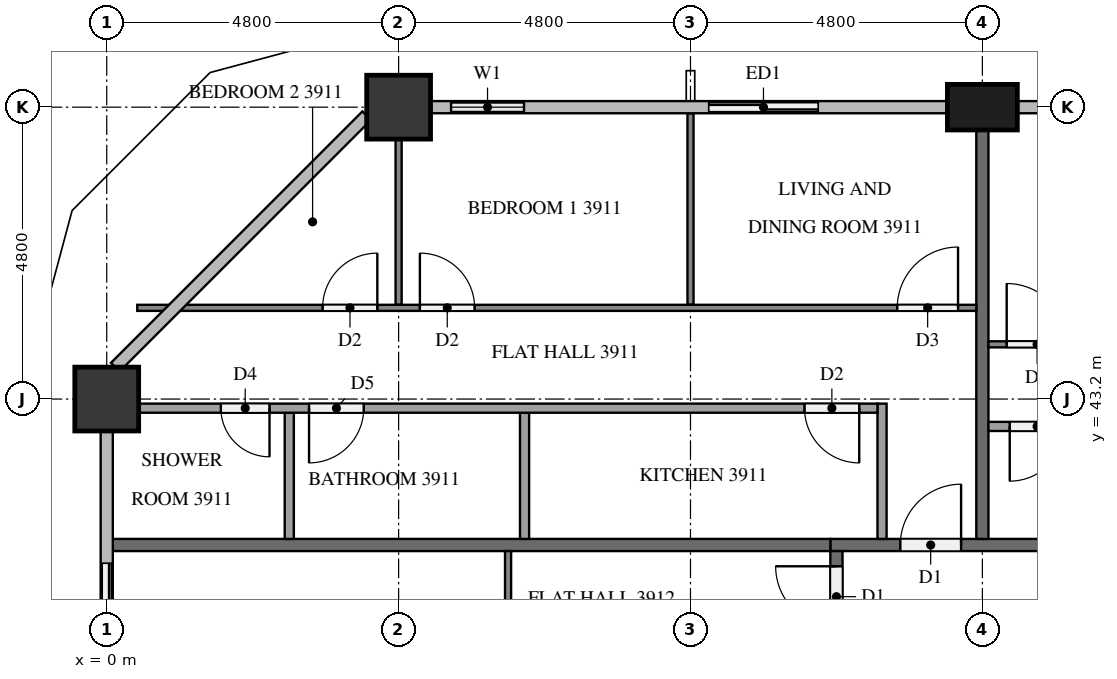
"""IFC4 building model, lengths in metres.
Left out: names, types, materials, properties, quantities, classifications, styles, units other than length and angle.
Written with IfcOpenShell. Run it as: python <this file> out.ifc"""

import sys

from ifc_helpers import new_model, si_unit, direction, frame, frame_2d, origin, origin_2d, place, context, subcontext, project, spatial, rectangle, extrude, element, fill, save


model = new_model("IFC4")
c1 = context("Model", 3, precision=1e-05, world=origin(), true_north=direction((0.0, 1.0)))
c2 = subcontext(c1, "Body", "Model", "MODEL_VIEW")
j1 = project(units=[si_unit("LENGTHUNIT", "METRE"), si_unit("PLANEANGLEUNIT", "RADIAN")], contexts=[c1])
p1 = place(None, origin())
s1 = spatial("IfcSite", under=j1, at=p1, CompositionType="ELEMENT")
p2 = place(p1, origin())
s2 = spatial("IfcBuilding", under=s1, at=p2, CompositionType="ELEMENT")
p3 = place(p2, frame((0.0, 0.0, 152.5)))
s3 = spatial("IfcBuildingStorey", under=s2, at=p3, CompositionType="ELEMENT", Elevation=152.5)
p4 = place(p3, frame((14.4, 48.0, 0.0), z_axis=(0.0, 0.0, 1.0), x_axis=(1.0, 0.0, 0.0)))
e1 = element("IfcColumn", 1, at=p4, inside=s3, PredefinedType="COLUMN", context=c2, shape_type="SweptSolid", body=[
    extrude(rectangle(XDim=1.15, YDim=0.75, at=origin_2d()), origin(), (0.0, 0.0, 1.0), 3.2),
])
for number, where, z_axis, x_axis in (
    (2, (4.8, 48.0, 0.0), (0.0, 0.0, 1.0), (1.0, 0.0, 0.0)),
    (3, (0.0, 43.2, 0.0), (0.0, 0.0, 1.0), (1.0, 0.0, 0.0)),
):
    element("IfcColumn", number, at=place(p3, frame(where, z_axis=z_axis, x_axis=x_axis)), inside=s3, PredefinedType="COLUMN", context=c2, shape_type="SweptSolid", body=[
        extrude(rectangle(XDim=1.05, YDim=1.05, at=origin_2d()), origin(), (0.0, 0.0, 1.0), 3.2),
    ])
p5 = place(p3, frame((12.0, 48.0, 0.0), z_axis=(0.0, 0.0, 1.0), x_axis=(-1.0, 0.0, 0.0)))
e4 = element("IfcWall", 4, at=p5, inside=s3, PredefinedType="SOLIDWALL", context=c2, shape_type="SweptSolid", body=[
    extrude(rectangle(XDim=2.4, YDim=0.15, at=frame_2d((1.2, 0.0))), origin(), (0.0, 0.0, 1.0), 3.2),
])
p6 = place(p5, frame((0.3, 0.0, 0.0)))
e5 = element("IfcOpeningElement", 5, at=p6, cuts=e4, PredefinedType="OPENING", context=c2, shape_type="SweptSolid", body=[
    extrude(rectangle(XDim=1.8, YDim=2.4, at=frame_2d((0.9, 1.2))), frame((0.0, 0.085, 0.0), z_axis=(0.0, -1.0, 0.0), x_axis=(1.0, 0.0, 0.0)), (0.0, 0.0, 1.0), 0.17),
])
p7 = place(p3, frame((7.2, 48.0, 0.0), z_axis=(0.0, 0.0, 1.0), x_axis=(-1.0, 0.0, 0.0)))
e6 = element("IfcWall", 6, at=p7, inside=s3, PredefinedType="SOLIDWALL", context=c2, shape_type="SweptSolid", body=[
    extrude(rectangle(XDim=1.875, YDim=0.15, at=frame_2d((0.938, 0.0))), origin(), (0.0, 0.0, 1.0), 3.2),
])
p8 = place(p7, frame((0.337, 0.0, 0.9)))
e7 = element("IfcOpeningElement", 7, at=p8, cuts=e6, PredefinedType="OPENING", context=c2, shape_type="SweptSolid", body=[
    extrude(rectangle(XDim=1.2, YDim=1.4, at=frame_2d((0.6, 0.7))), frame((0.0, 0.085, 0.0), z_axis=(0.0, -1.0, 0.0), x_axis=(1.0, 0.0, 0.0)), (0.0, 0.0, 1.0), 0.17),
])
p9 = place(p3, frame((0.0, 40.8, 0.0), z_axis=(0.0, 0.0, 1.0), x_axis=(0.0, -1.0, 0.0)))
e8 = element("IfcWall", 8, at=p9, inside=s3, PredefinedType="SOLIDWALL", context=c2, shape_type="SweptSolid", body=[
    extrude(rectangle(XDim=2.4, YDim=0.15, at=frame_2d((1.2, 0.0))), origin(), (0.0, 0.0, 1.0), 3.2),
])
p10 = place(p9, frame((0.3, 0.0, 0.0)))
e9 = element("IfcOpeningElement", 9, at=p10, cuts=e8, PredefinedType="OPENING", context=c2, shape_type="SweptSolid", body=[
    extrude(rectangle(XDim=1.8, YDim=2.4, at=frame_2d((0.9, 1.2))), frame((0.0, 0.085, 0.0), z_axis=(0.0, -1.0, 0.0), x_axis=(1.0, 0.0, 0.0)), (0.0, 0.0, 1.0), 0.17),
])
p11 = place(p3, frame((11.9, 40.8, 0.0), z_axis=(0.0, 0.0, 1.0), x_axis=(1.0, 0.0, 0.0)))
e10 = element("IfcWall", 10, at=p11, inside=s3, PredefinedType="PARTITIONING", context=c2, shape_type="SweptSolid", body=[
    extrude(rectangle(XDim=38.6, YDim=0.2, at=frame_2d((19.3, 0.0))), origin(), (0.0, 0.0, 1.0), 3.2),
])
p12 = place(p11, frame((31.65, 0.0, 0.0)))
e11 = element("IfcOpeningElement", 11, at=p12, cuts=e10, PredefinedType="OPENING", context=c2, shape_type="SweptSolid", body=[
    extrude(rectangle(XDim=1.0, YDim=2.1, at=frame_2d((0.5, 1.05))), frame((0.0, 0.11, 0.0), z_axis=(0.0, -1.0, 0.0), x_axis=(1.0, 0.0, 0.0)), (0.0, 0.0, 1.0), 0.22),
])
p13 = place(p11, frame((29.95, 0.0, 0.0)))
e12 = element("IfcOpeningElement", 12, at=p13, cuts=e10, PredefinedType="OPENING", context=c2, shape_type="SweptSolid", body=[
    extrude(rectangle(XDim=1.0, YDim=2.1, at=frame_2d((0.5, 1.05))), frame((0.0, 0.11, 0.0), z_axis=(0.0, -1.0, 0.0), x_axis=(1.0, 0.0, 0.0)), (0.0, 0.0, 1.0), 0.22),
])
p14 = place(p11, frame((15.55, 0.0, 0.0)))
e13 = element("IfcOpeningElement", 13, at=p14, cuts=e10, PredefinedType="OPENING", context=c2, shape_type="SweptSolid", body=[
    extrude(rectangle(XDim=1.0, YDim=2.1, at=frame_2d((0.5, 1.05))), frame((0.0, 0.11, 0.0), z_axis=(0.0, -1.0, 0.0), x_axis=(1.0, 0.0, 0.0)), (0.0, 0.0, 1.0), 0.22),
])
p15 = place(p11, frame((1.15, 0.0, 0.0)))
e14 = element("IfcOpeningElement", 14, at=p15, cuts=e10, PredefinedType="OPENING", context=c2, shape_type="SweptSolid", body=[
    extrude(rectangle(XDim=1.0, YDim=2.1, at=frame_2d((0.5, 1.05))), frame((0.0, 0.11, 0.0), z_axis=(0.0, -1.0, 0.0), x_axis=(1.0, 0.0, 0.0)), (0.0, 0.0, 1.0), 0.22),
])
p16 = place(p3, frame((12.0, 12.1, 0.0), z_axis=(0.0, 0.0, 1.0), x_axis=(0.0, 1.0, 0.0)))
e15 = element("IfcWall", 15, at=p16, inside=s3, PredefinedType="PARTITIONING", context=c2, shape_type="SweptSolid", body=[
    extrude(rectangle(XDim=28.6, YDim=0.2, at=frame_2d((14.3, 0.0))), origin(), (0.0, 0.0, 1.0), 3.2),
])
p17 = place(p16, frame((27.35, 0.0, 0.0)))
e16 = element("IfcOpeningElement", 16, at=p17, cuts=e15, PredefinedType="OPENING", context=c2, shape_type="SweptSolid", body=[
    extrude(rectangle(XDim=1.0, YDim=2.1, at=frame_2d((0.5, 1.05))), frame((0.0, 0.11, 0.0), z_axis=(0.0, -1.0, 0.0), x_axis=(1.0, 0.0, 0.0)), (0.0, 0.0, 1.0), 0.22),
])
p18 = place(p16, frame((20.15, 0.0, 0.0)))
e17 = element("IfcOpeningElement", 17, at=p18, cuts=e15, PredefinedType="OPENING", context=c2, shape_type="SweptSolid", body=[
    extrude(rectangle(XDim=1.0, YDim=2.1, at=frame_2d((0.5, 1.05))), frame((0.0, 0.11, 0.0), z_axis=(0.0, -1.0, 0.0), x_axis=(1.0, 0.0, 0.0)), (0.0, 0.0, 1.0), 0.22),
])
p19 = place(p16, frame((10.55, 0.0, 0.0)))
e18 = element("IfcOpeningElement", 18, at=p19, cuts=e15, PredefinedType="OPENING", context=c2, shape_type="SweptSolid", body=[
    extrude(rectangle(XDim=1.0, YDim=2.1, at=frame_2d((0.5, 1.05))), frame((0.0, 0.11, 0.0), z_axis=(0.0, -1.0, 0.0), x_axis=(1.0, 0.0, 0.0)), (0.0, 0.0, 1.0), 0.22),
])
p20 = place(p3, frame((14.4, 47.625, 0.0), z_axis=(0.0, 0.0, 1.0), x_axis=(0.0, -1.0, 0.0)))
e19 = element("IfcWall", 19, at=p20, inside=s3, PredefinedType="PARTITIONING", context=c2, shape_type="SweptSolid", body=[
    extrude(rectangle(XDim=6.725, YDim=0.2, at=frame_2d((3.363, 0.0))), origin(), (0.0, 0.0, 1.0), 3.2),
])
p21 = place(p3, frame((0.1, 40.8, 0.0), z_axis=(0.0, 0.0, 1.0), x_axis=(1.0, 0.0, 0.0)))
e20 = element("IfcWall", 20, at=p21, inside=s3, PredefinedType="PARTITIONING", context=c2, shape_type="SweptSolid", body=[
    extrude(rectangle(XDim=11.8, YDim=0.2, at=frame_2d((5.9, 0.0))), origin(), (0.0, 0.0, 1.0), 3.2),
])
p22 = place(p3, frame((14.5, 44.1, 0.0), z_axis=(0.0, 0.0, 1.0), x_axis=(1.0, 0.0, 0.0)))
e21 = element("IfcWall", 21, at=p22, inside=s3, PredefinedType="PARTITIONING", context=c2, shape_type="SweptSolid", body=[
    extrude(rectangle(XDim=14.2, YDim=0.1, at=frame_2d((7.1, 0.0))), origin(), (0.0, 0.0, 1.0), 3.2),
])
p23 = place(p22, frame((9.85, 0.0, 0.0)))
e22 = element("IfcOpeningElement", 22, at=p23, cuts=e21, PredefinedType="OPENING", context=c2, shape_type="SweptSolid", body=[
    extrude(rectangle(XDim=0.9, YDim=2.1, at=frame_2d((0.45, 1.05))), frame((0.0, 0.06, 0.0), z_axis=(0.0, -1.0, 0.0), x_axis=(1.0, 0.0, 0.0)), (0.0, 0.0, 1.0), 0.12),
])
p24 = place(p22, frame((8.25, 0.0, 0.0)))
e23 = element("IfcOpeningElement", 23, at=p24, cuts=e21, PredefinedType="OPENING", context=c2, shape_type="SweptSolid", body=[
    extrude(rectangle(XDim=0.9, YDim=2.1, at=frame_2d((0.45, 1.05))), frame((0.0, 0.06, 0.0), z_axis=(0.0, -1.0, 0.0), x_axis=(1.0, 0.0, 0.0)), (0.0, 0.0, 1.0), 0.12),
])
p25 = place(p22, frame((0.3, 0.0, 0.0)))
e24 = element("IfcOpeningElement", 24, at=p25, cuts=e21, PredefinedType="OPENING", context=c2, shape_type="SweptSolid", body=[
    extrude(rectangle(XDim=1.0, YDim=2.1, at=frame_2d((0.5, 1.05))), frame((0.0, 0.06, 0.0), z_axis=(0.0, -1.0, 0.0), x_axis=(1.0, 0.0, 0.0)), (0.0, 0.0, 1.0), 0.12),
])
p26 = place(p3, frame((27.075, 42.75, 0.0), z_axis=(0.0, 0.0, 1.0), x_axis=(-1.0, 0.0, 0.0)))
e25 = element("IfcWall", 25, at=p26, inside=s3, PredefinedType="PARTITIONING", context=c2, shape_type="SweptSolid", body=[
    extrude(rectangle(XDim=12.575, YDim=0.15, at=frame_2d((6.288, 0.0))), origin(), (0.0, 0.0, 1.0), 3.2),
])
p27 = place(p26, frame((2.644, 0.0, 0.0)))
e26 = element("IfcOpeningElement", 26, at=p27, cuts=e25, PredefinedType="OPENING", context=c2, shape_type="SweptSolid", body=[
    extrude(rectangle(XDim=0.9, YDim=2.1, at=frame_2d((0.45, 1.05))), frame((0.0, 0.085, 0.0), z_axis=(0.0, -1.0, 0.0), x_axis=(1.0, 0.0, 0.0)), (0.0, 0.0, 1.0), 0.17),
])
p28 = place(p26, frame((4.194, 0.0, 0.0)))
e27 = element("IfcOpeningElement", 27, at=p28, cuts=e25, PredefinedType="OPENING", context=c2, shape_type="SweptSolid", body=[
    extrude(rectangle(XDim=0.8, YDim=2.1, at=frame_2d((0.4, 1.05))), frame((0.0, 0.085, 0.0), z_axis=(0.0, -1.0, 0.0), x_axis=(1.0, 0.0, 0.0)), (0.0, 0.0, 1.0), 0.17),
])
p29 = place(p26, frame((11.325, 0.0, 0.0)))
e28 = element("IfcOpeningElement", 28, at=p29, cuts=e25, PredefinedType="OPENING", context=c2, shape_type="SweptSolid", body=[
    extrude(rectangle(XDim=0.9, YDim=2.1, at=frame_2d((0.45, 1.05))), frame((0.0, 0.085, 0.0), z_axis=(0.0, -1.0, 0.0), x_axis=(1.0, 0.0, 0.0)), (0.0, 0.0, 1.0), 0.17),
])
p30 = place(p3, frame((9.6, 44.75, 0.0), z_axis=(0.0, 0.0, 1.0), x_axis=(0.0, 1.0, 0.0)))
e29 = element("IfcWall", 29, at=p30, inside=s3, PredefinedType="PARTITIONING", context=c2, shape_type="SweptSolid", body=[
    extrude(rectangle(XDim=3.15, YDim=0.1, at=frame_2d((1.575, 0.0))), origin(), (0.0, 0.0, 1.0), 3.2),
])
p31 = place(p3, frame((4.8, 44.75, 0.0), z_axis=(0.0, 0.0, 1.0), x_axis=(0.0, 1.0, 0.0)))
e30 = element("IfcWall", 30, at=p31, inside=s3, PredefinedType="PARTITIONING", context=c2, shape_type="SweptSolid", body=[
    extrude(rectangle(XDim=2.725, YDim=0.1, at=frame_2d((1.363, 0.0))), origin(), (0.0, 0.0, 1.0), 3.2),
])
p32 = place(p3, frame((0.502, 44.7, 0.0), z_axis=(0.0, 0.0, 1.0), x_axis=(1.0, 0.0, 0.0)))
e31 = element("IfcWall", 31, at=p32, inside=s3, PredefinedType="PARTITIONING", context=c2, shape_type="SweptSolid", body=[
    extrude(rectangle(XDim=13.798, YDim=0.1, at=frame_2d((6.899, 0.0))), origin(), (0.0, 0.0, 1.0), 3.2),
])
p33 = place(p32, frame((12.498, 0.0, 0.0)))
e32 = element("IfcOpeningElement", 32, at=p33, cuts=e31, PredefinedType="OPENING", context=c2, shape_type="SweptSolid", body=[
    extrude(rectangle(XDim=1.0, YDim=2.1, at=frame_2d((0.5, 1.05))), frame((0.0, 0.06, 0.0), z_axis=(0.0, -1.0, 0.0), x_axis=(1.0, 0.0, 0.0)), (0.0, 0.0, 1.0), 0.12),
])
p34 = place(p32, frame((4.648, 0.0, 0.0)))
e33 = element("IfcOpeningElement", 33, at=p34, cuts=e31, PredefinedType="OPENING", context=c2, shape_type="SweptSolid", body=[
    extrude(rectangle(XDim=0.9, YDim=2.1, at=frame_2d((0.45, 1.05))), frame((0.0, 0.06, 0.0), z_axis=(0.0, -1.0, 0.0), x_axis=(1.0, 0.0, 0.0)), (0.0, 0.0, 1.0), 0.12),
])
p35 = place(p32, frame((3.048, 0.0, 0.0)))
e34 = element("IfcOpeningElement", 34, at=p35, cuts=e31, PredefinedType="OPENING", context=c2, shape_type="SweptSolid", body=[
    extrude(rectangle(XDim=0.9, YDim=2.1, at=frame_2d((0.45, 1.05))), frame((0.0, 0.06, 0.0), z_axis=(0.0, -1.0, 0.0), x_axis=(1.0, 0.0, 0.0)), (0.0, 0.0, 1.0), 0.12),
])
for number, where, z_axis, x_axis in (
    (35, (6.871, 40.9, 0.0), (0.0, 0.0, 1.0), (0.0, 1.0, 0.0)),
    (36, (3.002, 40.9, 0.0), (0.0, 0.0, 1.0), (0.0, 1.0, 0.0)),
):
    element("IfcWall", number, at=place(p3, frame(where, z_axis=z_axis, x_axis=x_axis)), inside=s3, PredefinedType="PARTITIONING", context=c2, shape_type="SweptSolid", body=[
        extrude(rectangle(XDim=2.075, YDim=0.15, at=frame_2d((1.038, 0.0))), origin(), (0.0, 0.0, 1.0), 3.2),
    ])
p36 = place(p3, frame((12.75, 40.9, 0.0), z_axis=(0.0, 0.0, 1.0), x_axis=(0.0, 1.0, 0.0)))
e37 = element("IfcWall", 37, at=p36, inside=s3, PredefinedType="PARTITIONING", context=c2, shape_type="SweptSolid", body=[
    extrude(rectangle(XDim=2.225, YDim=0.15, at=frame_2d((1.113, 0.0))), origin(), (0.0, 0.0, 1.0), 3.2),
])
p37 = place(p3, frame((12.675, 43.05, 0.0), z_axis=(0.0, 0.0, 1.0), x_axis=(-1.0, 0.0, 0.0)))
e38 = element("IfcWall", 38, at=p37, inside=s3, PredefinedType="PARTITIONING", context=c2, shape_type="SweptSolid", body=[
    extrude(rectangle(XDim=12.15, YDim=0.15, at=frame_2d((6.075, 0.0))), origin(), (0.0, 0.0, 1.0), 3.2),
])
p38 = place(p37, frame((0.3, 0.0, 0.0)))
e39 = element("IfcOpeningElement", 39, at=p38, cuts=e38, PredefinedType="OPENING", context=c2, shape_type="SweptSolid", body=[
    extrude(rectangle(XDim=0.9, YDim=2.1, at=frame_2d((0.45, 1.05))), frame((0.0, 0.085, 0.0), z_axis=(0.0, -1.0, 0.0), x_axis=(1.0, 0.0, 0.0)), (0.0, 0.0, 1.0), 0.17),
])
p39 = place(p37, frame((8.448, 0.0, 0.0)))
e40 = element("IfcOpeningElement", 40, at=p39, cuts=e38, PredefinedType="OPENING", context=c2, shape_type="SweptSolid", body=[
    extrude(rectangle(XDim=0.9, YDim=2.1, at=frame_2d((0.45, 1.05))), frame((0.0, 0.085, 0.0), z_axis=(0.0, -1.0, 0.0), x_axis=(1.0, 0.0, 0.0)), (0.0, 0.0, 1.0), 0.17),
])
p40 = place(p37, frame((9.998, 0.0, 0.0)))
e41 = element("IfcOpeningElement", 41, at=p40, cuts=e38, PredefinedType="OPENING", context=c2, shape_type="SweptSolid", body=[
    extrude(rectangle(XDim=0.8, YDim=2.1, at=frame_2d((0.4, 1.05))), frame((0.0, 0.085, 0.0), z_axis=(0.0, -1.0, 0.0), x_axis=(1.0, 0.0, 0.0)), (0.0, 0.0, 1.0), 0.17),
])
p41 = place(p3, frame((6.6, 33.7, 0.0), z_axis=(0.0, 0.0, 1.0), x_axis=(0.0, 1.0, 0.0)))
e42 = element("IfcWall", 42, at=p41, inside=s3, PredefinedType="PARTITIONING", context=c2, shape_type="SweptSolid", body=[
    extrude(rectangle(XDim=7.0, YDim=0.1, at=frame_2d((3.5, 0.0))), origin(), (0.0, 0.0, 1.0), 3.2),
])
p42 = place(p41, frame((0.3, 0.0, 0.0)))
e43 = element("IfcOpeningElement", 43, at=p42, cuts=e42, PredefinedType="OPENING", context=c2, shape_type="SweptSolid", body=[
    extrude(rectangle(XDim=1.0, YDim=2.1, at=frame_2d((0.5, 1.05))), frame((0.0, 0.06, 0.0), z_axis=(0.0, -1.0, 0.0), x_axis=(1.0, 0.0, 0.0)), (0.0, 0.0, 1.0), 0.12),
])
p43 = place(p6, origin())
e44 = element("IfcDoor", 44, at=p43, inside=s3, OperationType="SLIDING_TO_RIGHT", PredefinedType="DOOR", context=c2, shape_type="SweptSolid", body=[
    extrude(rectangle(XDim=1.8, YDim=2.4, at=frame_2d((0.9, 1.2))), frame((0.0, 0.025, 0.0), z_axis=(0.0, -1.0, 0.0), x_axis=(1.0, 0.0, 0.0)), (0.0, 0.0, 1.0), 0.05),
])
fill(e5, e44)
p44 = place(p8, origin())
e45 = element("IfcWindow", 45, at=p44, inside=s3, PartitioningType="SINGLE_PANEL", PredefinedType="WINDOW", context=c2, shape_type="SweptSolid", body=[
    extrude(rectangle(XDim=1.2, YDim=1.4, at=frame_2d((0.6, 0.7))), frame((0.0, 0.03, 0.0), z_axis=(0.0, -1.0, 0.0), x_axis=(1.0, 0.0, 0.0)), (0.0, 0.0, 1.0), 0.06),
])
fill(e7, e45)
p45 = place(p10, origin())
e46 = element("IfcDoor", 46, at=p45, inside=s3, OperationType="SLIDING_TO_LEFT", PredefinedType="DOOR", context=c2, shape_type="SweptSolid", body=[
    extrude(rectangle(XDim=1.8, YDim=2.4, at=frame_2d((0.9, 1.2))), frame((0.0, 0.025, 0.0), z_axis=(0.0, -1.0, 0.0), x_axis=(1.0, 0.0, 0.0)), (0.0, 0.0, 1.0), 0.05),
])
fill(e9, e46)
p46 = place(p15, origin())
e47 = element("IfcDoor", 47, at=p46, inside=s3, OperationType="SINGLE_SWING_RIGHT", PredefinedType="DOOR", context=c2, shape_type="SweptSolid", body=[
    extrude(rectangle(XDim=1.0, YDim=2.1, at=frame_2d((0.5, 1.05))), frame((0.0, 0.025, 0.0), z_axis=(0.0, -1.0, 0.0), x_axis=(1.0, 0.0, 0.0)), (0.0, 0.0, 1.0), 0.05),
])
fill(e14, e47)
p47 = place(p17, origin())
e48 = element("IfcDoor", 48, at=p47, inside=s3, OperationType="SINGLE_SWING_RIGHT", PredefinedType="DOOR", context=c2, shape_type="SweptSolid", body=[
    extrude(rectangle(XDim=1.0, YDim=2.1, at=frame_2d((0.5, 1.05))), frame((0.0, 0.025, 0.0), z_axis=(0.0, -1.0, 0.0), x_axis=(1.0, 0.0, 0.0)), (0.0, 0.0, 1.0), 0.05),
])
fill(e16, e48)
p48 = place(p25, origin())
e49 = element("IfcDoor", 49, at=p48, inside=s3, OperationType="SINGLE_SWING_LEFT", PredefinedType="DOOR", context=c2, shape_type="SweptSolid", body=[
    extrude(rectangle(XDim=1.0, YDim=2.1, at=frame_2d((0.5, 1.05))), frame((0.0, 0.025, 0.0), z_axis=(0.0, -1.0, 0.0), x_axis=(1.0, 0.0, 0.0)), (0.0, 0.0, 1.0), 0.05),
])
fill(e24, e49)
p49 = place(p29, origin())
e50 = element("IfcDoor", 50, at=p49, inside=s3, OperationType="SINGLE_SWING_RIGHT", PredefinedType="DOOR", context=c2, shape_type="SweptSolid", body=[
    extrude(rectangle(XDim=0.9, YDim=2.1, at=frame_2d((0.45, 1.05))), frame((0.0, 0.025, 0.0), z_axis=(0.0, -1.0, 0.0), x_axis=(1.0, 0.0, 0.0)), (0.0, 0.0, 1.0), 0.05),
])
fill(e28, e50)
p50 = place(p33, origin())
e51 = element("IfcDoor", 51, at=p50, inside=s3, OperationType="SINGLE_SWING_RIGHT", PredefinedType="DOOR", context=c2, shape_type="SweptSolid", body=[
    extrude(rectangle(XDim=1.0, YDim=2.1, at=frame_2d((0.5, 1.05))), frame((0.0, 0.025, 0.0), z_axis=(0.0, -1.0, 0.0), x_axis=(1.0, 0.0, 0.0)), (0.0, 0.0, 1.0), 0.05),
])
fill(e32, e51)
p51 = place(p34, origin())
e52 = element("IfcDoor", 52, at=p51, inside=s3, OperationType="SINGLE_SWING_LEFT", PredefinedType="DOOR", context=c2, shape_type="SweptSolid", body=[
    extrude(rectangle(XDim=0.9, YDim=2.1, at=frame_2d((0.45, 1.05))), frame((0.0, 0.025, 0.0), z_axis=(0.0, -1.0, 0.0), x_axis=(1.0, 0.0, 0.0)), (0.0, 0.0, 1.0), 0.05),
])
fill(e33, e52)
p52 = place(p35, origin())
e53 = element("IfcDoor", 53, at=p52, inside=s3, OperationType="SINGLE_SWING_RIGHT", PredefinedType="DOOR", context=c2, shape_type="SweptSolid", body=[
    extrude(rectangle(XDim=0.9, YDim=2.1, at=frame_2d((0.45, 1.05))), frame((0.0, 0.025, 0.0), z_axis=(0.0, -1.0, 0.0), x_axis=(1.0, 0.0, 0.0)), (0.0, 0.0, 1.0), 0.05),
])
fill(e34, e53)
p53 = place(p38, origin())
e54 = element("IfcDoor", 54, at=p53, inside=s3, OperationType="SINGLE_SWING_LEFT", PredefinedType="DOOR", context=c2, shape_type="SweptSolid", body=[
    extrude(rectangle(XDim=0.9, YDim=2.1, at=frame_2d((0.45, 1.05))), frame((0.0, 0.025, 0.0), z_axis=(0.0, -1.0, 0.0), x_axis=(1.0, 0.0, 0.0)), (0.0, 0.0, 1.0), 0.05),
])
fill(e39, e54)
p54 = place(p39, origin())
e55 = element("IfcDoor", 55, at=p54, inside=s3, OperationType="SINGLE_SWING_RIGHT", PredefinedType="DOOR", context=c2, shape_type="SweptSolid", body=[
    extrude(rectangle(XDim=0.9, YDim=2.1, at=frame_2d((0.45, 1.05))), frame((0.0, 0.025, 0.0), z_axis=(0.0, -1.0, 0.0), x_axis=(1.0, 0.0, 0.0)), (0.0, 0.0, 1.0), 0.05),
])
fill(e40, e55)
p55 = place(p40, origin())
e56 = element("IfcDoor", 56, at=p55, inside=s3, OperationType="SINGLE_SWING_LEFT", PredefinedType="DOOR", context=c2, shape_type="SweptSolid", body=[
    extrude(rectangle(XDim=0.8, YDim=2.1, at=frame_2d((0.4, 1.05))), frame((0.0, 0.025, 0.0), z_axis=(0.0, -1.0, 0.0), x_axis=(1.0, 0.0, 0.0)), (0.0, 0.0, 1.0), 0.05),
])
fill(e41, e56)
save(model, sys.argv[1])
